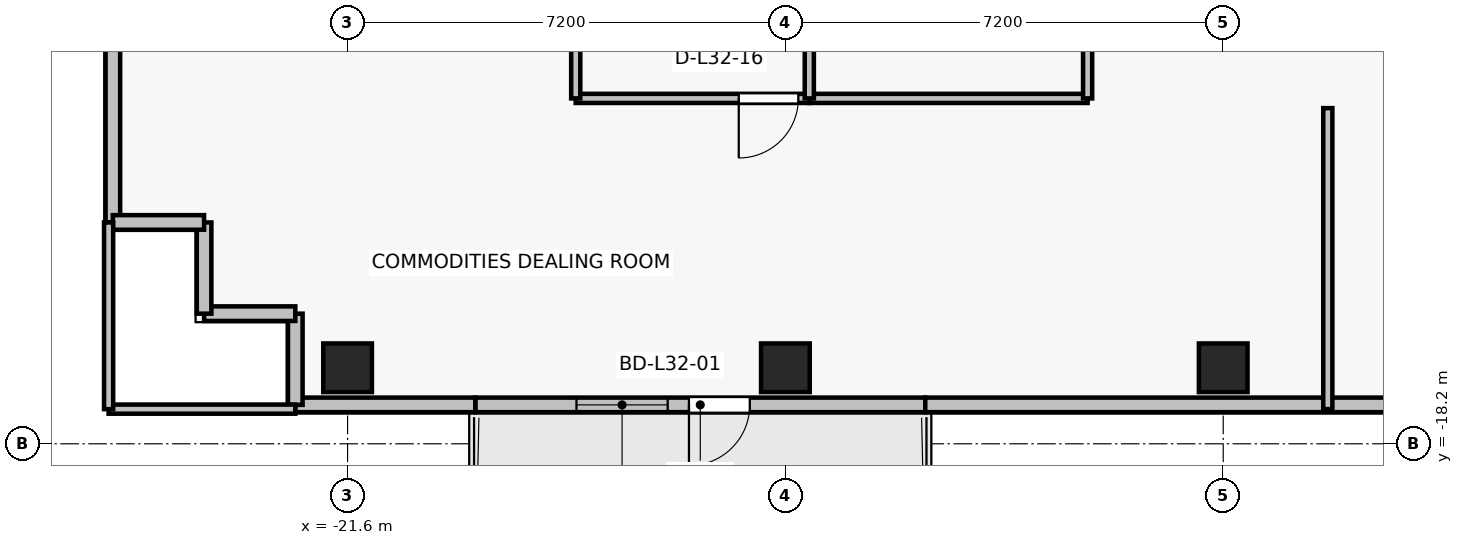
"""IFC4 building model, lengths in metres.
Left out: names, types, materials, properties, quantities, classifications, styles, units other than length and angle.
Written with IfcOpenShell. Run it as: python <this file> out.ifc"""

import sys

from ifc_helpers import new_model, si_unit, direction, frame, frame_2d, origin, origin_2d, place, context, subcontext, project, spatial, rectangle, extrude, source, transform, mapped, element, fill, save


model = new_model("IFC4")
c1 = context("Model", 3, precision=1e-05, world=origin(), true_north=direction((0.0, 1.0)))
c2 = subcontext(c1, "Body", "Model", "MODEL_VIEW")
j1 = project(units=[si_unit("LENGTHUNIT", "METRE"), si_unit("PLANEANGLEUNIT", "RADIAN")], contexts=[c1])
p1 = place(None, origin())
s1 = spatial("IfcSite", under=j1, at=p1, CompositionType="ELEMENT")
p2 = place(p1, origin())
s2 = spatial("IfcBuilding", under=s1, at=p2, CompositionType="ELEMENT")
p3 = place(p2, frame((0.0, 0.0, 116.5)))
s3 = spatial("IfcBuildingStorey", under=s2, at=p3, CompositionType="ELEMENT", Elevation=116.5)
for number, where, z_axis, x_axis in (
    (1, (-14.4, -16.95, 0.0), (0.0, 0.0, 1.0), (1.0, 0.0, 0.0)),
    (2, (-7.2, -16.95, 0.0), (0.0, 0.0, 1.0), (1.0, 0.0, 0.0)),
    (3, (-21.6, -16.95, 0.0), (0.0, 0.0, 1.0), (1.0, 0.0, 0.0)),
):
    element("IfcColumn", number, at=place(p3, frame(where, z_axis=z_axis, x_axis=x_axis)), inside=s3, PredefinedType="COLUMN", context=c2, shape_type="SweptSolid", body=[
        extrude(rectangle(XDim=0.8, YDim=0.8, at=origin_2d()), origin(), (0.0, 0.0, 1.0), 3.3),
    ])
p4 = place(p3, frame((-12.1, -17.56, 0.0), z_axis=(0.0, 0.0, 1.0), x_axis=(-1.0, 0.0, 0.0)))
e4 = element("IfcWall", 4, at=p4, inside=s3, PredefinedType="SOLIDWALL", context=c2, shape_type="SweptSolid", body=[
    extrude(rectangle(XDim=7.4, YDim=0.24, at=frame_2d((3.7, 0.0))), origin(), (0.0, 0.0, 1.0), 2.665),
])
p5 = place(p4, frame((2.886, 0.0, 0.0)))
e5 = element("IfcOpeningElement", 5, at=p5, cuts=e4, PredefinedType="OPENING", context=c2, shape_type="SweptSolid", body=[
    extrude(rectangle(XDim=1.0, YDim=2.2, at=frame_2d((0.5, 1.1))), frame((0.0, 0.13, 0.0), z_axis=(0.0, -1.0, 0.0), x_axis=(1.0, 0.0, 0.0)), (0.0, 0.0, 1.0), 0.26),
])
p6 = place(p4, frame((4.236, 0.0, 0.85)))
e6 = element("IfcOpeningElement", 6, at=p6, cuts=e4, PredefinedType="OPENING", context=c2, shape_type="SweptSolid", body=[
    extrude(rectangle(XDim=1.5, YDim=1.6, at=frame_2d((0.75, 0.8))), frame((0.0, 0.13, 0.0), z_axis=(0.0, -1.0, 0.0), x_axis=(1.0, 0.0, 0.0)), (0.0, 0.0, 1.0), 0.26),
])
p7 = place(p3, frame((-25.46, -8.3, 0.0), z_axis=(0.0, 0.0, 1.0), x_axis=(0.0, -1.0, 0.0)))
e7 = element("IfcWall", 7, at=p7, inside=s3, PredefinedType="SOLIDWALL", context=c2, shape_type="SweptSolid", body=[
    extrude(rectangle(XDim=6.26, YDim=0.24, at=frame_2d((3.13, 0.0))), origin(), (0.0, 0.0, 1.0), 3.075),
])
p8 = place(p3, frame((-12.1, -17.56, 0.0), z_axis=(0.0, 0.0, 1.0), x_axis=(1.0, 0.0, 0.0)))
e8 = element("IfcWall", 8, at=p8, inside=s3, PredefinedType="SOLIDWALL", context=c2, shape_type="SweptSolid", body=[
    extrude(rectangle(XDim=8.76, YDim=0.24, at=frame_2d((4.38, 0.0))), origin(), (0.0, 0.0, 1.0), 3.075),
])
p9 = place(p3, frame((-22.46, -17.56, 0.0), z_axis=(0.0, 0.0, 1.0), x_axis=(1.0, 0.0, 0.0)))
e9 = element("IfcWall", 9, at=p9, inside=s3, PredefinedType="SOLIDWALL", context=c2, shape_type="SweptSolid", body=[
    extrude(rectangle(XDim=2.96, YDim=0.24, at=frame_2d((1.48, 0.0))), origin(), (0.0, 0.0, 1.0), 2.665),
])
p10 = place(p3, frame((-22.46, -16.06, 0.0), z_axis=(0.0, 0.0, 1.0), x_axis=(0.0, -1.0, 0.0)))
e10 = element("IfcWall", 10, at=p10, inside=s3, PredefinedType="SOLIDWALL", context=c2, shape_type="SweptSolid", body=[
    extrude(rectangle(XDim=1.5, YDim=0.24, at=frame_2d((0.75, 0.0))), origin(), (0.0, 0.0, 1.0), 2.565),
])
for number, where, z_axis, x_axis in (
    (11, (-23.96, -16.06, 0.0), (0.0, 0.0, 1.0), (1.0, 0.0, 0.0)),
    (12, (-23.96, -14.56, 0.0), (0.0, 0.0, 1.0), (0.0, -1.0, 0.0)),
    (13, (-25.46, -14.56, 0.0), (0.0, 0.0, 1.0), (1.0, 0.0, 0.0)),
):
    element("IfcWall", number, at=place(p3, frame(where, z_axis=z_axis, x_axis=x_axis)), inside=s3, PredefinedType="SOLIDWALL", context=c2, shape_type="SweptSolid", body=[
        extrude(rectangle(XDim=1.5, YDim=0.24, at=frame_2d((0.75, 0.0))), origin(), (0.0, 0.0, 1.0), 3.075),
    ])
p11 = place(p3, frame((-14.007, -12.52, 0.0), z_axis=(0.0, 0.0, 1.0), x_axis=(-1.0, 0.0, 0.0)))
e14 = element("IfcWall", 14, at=p11, inside=s3, PredefinedType="PARTITIONING", context=c2, shape_type="SweptSolid", body=[
    extrude(rectangle(XDim=3.841, YDim=0.15, at=frame_2d((1.92, 0.0))), origin(), (0.0, 0.0, 1.0), 2.515),
])
p12 = place(p11, frame((0.18, 0.0, 0.0)))
e15 = element("IfcOpeningElement", 15, at=p12, cuts=e14, PredefinedType="OPENING", context=c2, shape_type="SweptSolid", body=[
    extrude(rectangle(XDim=0.98, YDim=2.15, at=frame_2d((0.49, 1.075))), frame((0.0, 0.085, 0.0), z_axis=(0.0, -1.0, 0.0), x_axis=(1.0, 0.0, 0.0)), (0.0, 0.0, 1.0), 0.17),
])
p13 = place(p3, frame((-17.848, -12.52, 0.0), z_axis=(0.0, 0.0, 1.0), x_axis=(0.0, 1.0, 0.0)))
e16 = element("IfcWall", 16, at=p13, inside=s3, PredefinedType="PARTITIONING", context=c2, shape_type="SweptSolid", body=[
    extrude(rectangle(XDim=8.69, YDim=0.15, at=frame_2d((4.345, 0.0))), origin(), (0.0, 0.0, 1.0), 2.515),
])
p14 = place(p3, frame((-9.43, -12.52, 0.0), z_axis=(0.0, 0.0, 1.0), x_axis=(-1.0, 0.0, 0.0)))
e17 = element("IfcWall", 17, at=p14, inside=s3, PredefinedType="PARTITIONING", context=c2, shape_type="SweptSolid", body=[
    extrude(rectangle(XDim=4.577, YDim=0.15, at=frame_2d((2.289, 0.0))), origin(), (0.0, 0.0, 1.0), 2.665),
])
p15 = place(p3, frame((-14.007, -12.52, 0.0), z_axis=(0.0, 0.0, 1.0), x_axis=(0.0, 1.0, 0.0)))
e18 = element("IfcWall", 18, at=p15, inside=s3, PredefinedType="PARTITIONING", context=c2, shape_type="SweptSolid", body=[
    extrude(rectangle(XDim=2.45, YDim=0.15, at=frame_2d((1.225, 0.0))), origin(), (0.0, 0.0, 1.0), 3.075),
])
p16 = place(p3, frame((-9.43, -3.83, 0.0), z_axis=(0.0, 0.0, 1.0), x_axis=(0.0, -1.0, 0.0)))
e19 = element("IfcWall", 19, at=p16, inside=s3, PredefinedType="PARTITIONING", context=c2, shape_type="SweptSolid", body=[
    extrude(rectangle(XDim=8.69, YDim=0.15, at=frame_2d((4.345, 0.0))), origin(), (0.0, 0.0, 1.0), 2.515),
])
p17 = place(p3, frame((-22.46, -17.63, 0.0), z_axis=(0.0, 0.0, 1.0), x_axis=(-1.0, 0.0, 0.0)))
e20 = element("IfcWall", 20, at=p17, inside=s3, PredefinedType="PARTITIONING", context=c2, shape_type="SweptSolid", body=[
    extrude(rectangle(XDim=3.07, YDim=0.15, at=frame_2d((1.535, 0.0))), origin(), (0.0, 0.0, 1.0), 2.665),
])
p18 = place(p3, frame((-25.53, -17.63, 0.0), z_axis=(0.0, 0.0, 1.0), x_axis=(0.0, 1.0, 0.0)))
e21 = element("IfcWall", 21, at=p18, inside=s3, PredefinedType="PARTITIONING", context=c2, shape_type="SweptSolid", body=[
    extrude(rectangle(XDim=3.07, YDim=0.15, at=frame_2d((1.535, 0.0))), origin(), (0.0, 0.0, 1.0), 3.075),
])
p19 = place(p3, frame((-5.48, -12.68, 0.0), z_axis=(0.0, 0.0, 1.0), x_axis=(0.0, -1.0, 0.0)))
e22 = element("IfcWall", 22, at=p19, inside=s3, PredefinedType="PARTITIONING", context=c2, shape_type="SweptSolid", body=[
    extrude(rectangle(XDim=4.95, YDim=0.15, at=frame_2d((2.475, 0.0))), origin(), (0.0, 0.0, 1.0), 2.565),
])
m1 = source(origin(), c2, "Body", "SweptSolid", [
    extrude(rectangle(XDim=1.0, YDim=2.2, at=frame_2d((0.5, 1.1))), frame((0.0, 0.025, 0.0), z_axis=(0.0, -1.0, 0.0), x_axis=(1.0, 0.0, 0.0)), (0.0, 0.0, 1.0), 0.05),
])
p20 = place(p5, origin())
e23 = element("IfcDoor", 23, at=p20, inside=s3, OperationType="SINGLE_SWING_RIGHT", PredefinedType="DOOR", context=c2, shape_type="MappedRepresentation", body=[
    mapped(m1, transform((0.0, 0.0, 0.0), x_axis=(1.0, 0.0, 0.0), y_axis=(0.0, 1.0, 0.0), z_axis=(0.0, 0.0, 1.0), scale=1.0)),
])
fill(e5, e23)
m2 = source(origin(), c2, "Body", "SweptSolid", [
    extrude(rectangle(XDim=1.5, YDim=1.6, at=frame_2d((0.75, 0.8))), frame((0.0, 0.03, 0.0), z_axis=(0.0, -1.0, 0.0), x_axis=(1.0, 0.0, 0.0)), (0.0, 0.0, 1.0), 0.06),
])
p21 = place(p6, origin())
e24 = element("IfcWindow", 24, at=p21, inside=s3, PartitioningType="SINGLE_PANEL", PredefinedType="WINDOW", context=c2, shape_type="MappedRepresentation", body=[
    mapped(m2, transform((0.0, 0.0, 0.0), x_axis=(1.0, 0.0, 0.0), y_axis=(0.0, 1.0, 0.0), z_axis=(0.0, 0.0, 1.0), scale=1.0)),
])
fill(e6, e24)
m3 = source(origin(), c2, "Body", "SweptSolid", [
    extrude(rectangle(XDim=0.98, YDim=2.15, at=frame_2d((0.49, 1.075))), frame((0.0, 0.025, 0.0), z_axis=(0.0, -1.0, 0.0), x_axis=(1.0, 0.0, 0.0)), (0.0, 0.0, 1.0), 0.05),
])
p22 = place(p12, origin())
e25 = element("IfcDoor", 25, at=p22, inside=s3, OperationType="SINGLE_SWING_RIGHT", PredefinedType="DOOR", context=c2, shape_type="MappedRepresentation", body=[
    mapped(m3, transform((0.0, 0.0, 0.0), x_axis=(1.0, 0.0, 0.0), y_axis=(0.0, 1.0, 0.0), z_axis=(0.0, 0.0, 1.0), scale=1.0)),
])
fill(e15, e25)
save(model, sys.argv[1])
